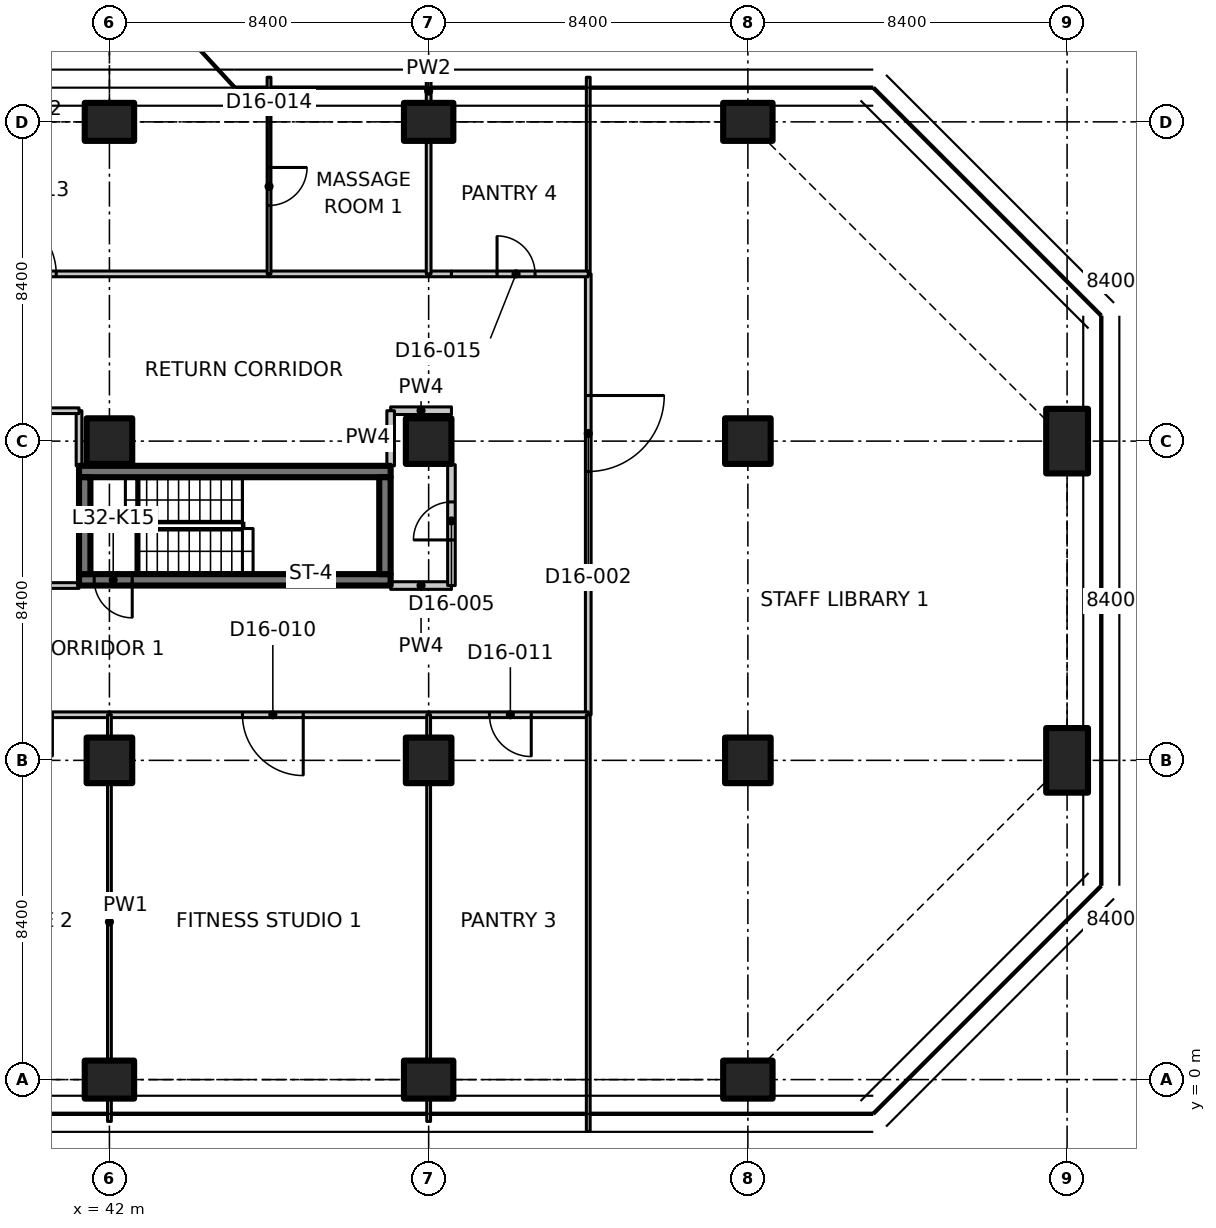
"""IFC4 building model, lengths in metres.
Left out: names, types, materials, properties, quantities, classifications, styles, units other than length and angle.
Written with IfcOpenShell. Run it as: python <this file> out.ifc"""

import sys

from ifc_helpers import new_model, si_unit, direction, frame, frame_2d, origin, origin_2d, place, context, subcontext, project, spatial, polyline, rectangle, outline, extrude, element, fill, save


model = new_model("IFC4")
c1 = context("Model", 3, precision=1e-05, world=origin(), true_north=direction((0.0, 1.0)))
c2 = subcontext(c1, "Body", "Model", "MODEL_VIEW")
j1 = project(units=[si_unit("LENGTHUNIT", "METRE"), si_unit("PLANEANGLEUNIT", "RADIAN")], contexts=[c1])
p1 = place(None, origin())
s1 = spatial("IfcSite", under=j1, at=p1, CompositionType="ELEMENT")
p2 = place(p1, origin())
s2 = spatial("IfcBuilding", under=s1, at=p2, CompositionType="ELEMENT")
p3 = place(p2, frame((0.0, 0.0, 131.3)))
s3 = spatial("IfcBuildingStorey", under=s2, at=p3, CompositionType="ELEMENT", Elevation=131.3)
p4 = place(p3, frame((42.0, 0.0, 0.0), z_axis=(0.0, 0.0, 1.0), x_axis=(0.0, 1.0, 0.0)))
e1 = element("IfcColumn", 1, at=p4, inside=s3, PredefinedType="COLUMN", context=c2, shape_type="SweptSolid", body=[
    extrude(rectangle(XDim=1.0, YDim=1.3, at=origin_2d()), origin(), (0.0, 0.0, 1.0), 3.35),
])
for number, where, z_axis, x_axis in (
    (2, (42.0, 8.4, 0.0), (0.0, 0.0, 1.0), (1.0, 0.0, 0.0)),
    (3, (42.0, 16.8, 0.0), (0.0, 0.0, 1.0), (1.0, 0.0, 0.0)),
):
    element("IfcColumn", number, at=place(p3, frame(where, z_axis=z_axis, x_axis=x_axis)), inside=s3, PredefinedType="COLUMN", context=c2, shape_type="SweptSolid", body=[
        extrude(rectangle(XDim=1.2, YDim=1.2, at=origin_2d()), origin(), (0.0, 0.0, 1.0), 3.35),
    ])
for number, where, z_axis, x_axis in (
    (4, (42.0, 25.2, 0.0), (0.0, 0.0, 1.0), (0.0, 1.0, 0.0)),
    (5, (50.4, 0.0, 0.0), (0.0, 0.0, 1.0), (0.0, 1.0, 0.0)),
):
    element("IfcColumn", number, at=place(p3, frame(where, z_axis=z_axis, x_axis=x_axis)), inside=s3, PredefinedType="COLUMN", context=c2, shape_type="SweptSolid", body=[
        extrude(rectangle(XDim=1.0, YDim=1.3, at=origin_2d()), origin(), (0.0, 0.0, 1.0), 3.35),
    ])
for number, where, z_axis, x_axis in (
    (6, (50.4, 8.4, 0.0), (0.0, 0.0, 1.0), (1.0, 0.0, 0.0)),
    (7, (50.4, 16.8, 0.0), (0.0, 0.0, 1.0), (1.0, 0.0, 0.0)),
):
    element("IfcColumn", number, at=place(p3, frame(where, z_axis=z_axis, x_axis=x_axis)), inside=s3, PredefinedType="COLUMN", context=c2, shape_type="SweptSolid", body=[
        extrude(rectangle(XDim=1.2, YDim=1.2, at=origin_2d()), origin(), (0.0, 0.0, 1.0), 3.35),
    ])
for number, where, z_axis, x_axis in (
    (8, (50.4, 25.2, 0.0), (0.0, 0.0, 1.0), (0.0, 1.0, 0.0)),
    (9, (58.8, 0.0, 0.0), (0.0, 0.0, 1.0), (0.0, 1.0, 0.0)),
):
    element("IfcColumn", number, at=place(p3, frame(where, z_axis=z_axis, x_axis=x_axis)), inside=s3, PredefinedType="COLUMN", context=c2, shape_type="SweptSolid", body=[
        extrude(rectangle(XDim=1.0, YDim=1.3, at=origin_2d()), origin(), (0.0, 0.0, 1.0), 3.35),
    ])
for number, where, z_axis, x_axis in (
    (10, (58.8, 8.4, 0.0), (0.0, 0.0, 1.0), (1.0, 0.0, 0.0)),
    (11, (58.8, 16.8, 0.0), (0.0, 0.0, 1.0), (1.0, 0.0, 0.0)),
):
    element("IfcColumn", number, at=place(p3, frame(where, z_axis=z_axis, x_axis=x_axis)), inside=s3, PredefinedType="COLUMN", context=c2, shape_type="SweptSolid", body=[
        extrude(rectangle(XDim=1.2, YDim=1.2, at=origin_2d()), origin(), (0.0, 0.0, 1.0), 3.35),
    ])
p5 = place(p3, frame((58.8, 25.2, 0.0), z_axis=(0.0, 0.0, 1.0), x_axis=(0.0, 1.0, 0.0)))
e12 = element("IfcColumn", 12, at=p5, inside=s3, PredefinedType="COLUMN", context=c2, shape_type="SweptSolid", body=[
    extrude(rectangle(XDim=1.0, YDim=1.3, at=origin_2d()), origin(), (0.0, 0.0, 1.0), 3.35),
])
for number, where, z_axis, x_axis in (
    (13, (67.2, 8.4, 0.0), (0.0, 0.0, 1.0), (1.0, 0.0, 0.0)),
    (14, (67.2, 16.8, 0.0), (0.0, 0.0, 1.0), (1.0, 0.0, 0.0)),
):
    element("IfcColumn", number, at=place(p3, frame(where, z_axis=z_axis, x_axis=x_axis)), inside=s3, PredefinedType="COLUMN", context=c2, shape_type="SweptSolid", body=[
        extrude(rectangle(XDim=1.1, YDim=1.7, at=origin_2d()), origin(), (0.0, 0.0, 1.0), 3.35),
    ])
p6 = place(p3, frame((49.4, 13.15, 0.0), z_axis=(0.0, 0.0, 1.0), x_axis=(-1.0, 0.0, 0.0)))
e15 = element("IfcWall", 15, at=p6, inside=s3, PredefinedType="SHEAR", context=c2, shape_type="SweptSolid", body=[
    extrude(rectangle(XDim=8.2, YDim=0.3, at=frame_2d((4.1, 0.0))), origin(), (0.0, 0.0, 1.0), 3.35),
])
p7 = place(p6, frame((6.8, 0.0, 0.0)))
e16 = element("IfcOpeningElement", 16, at=p7, cuts=e15, PredefinedType="OPENING", context=c2, shape_type="SweptSolid", body=[
    extrude(rectangle(XDim=1.0, YDim=2.1, at=frame_2d((0.5, 1.05))), frame((0.0, 0.16, 0.0), z_axis=(0.0, -1.0, 0.0), x_axis=(1.0, 0.0, 0.0)), (0.0, 0.0, 1.0), 0.32),
])
p8 = place(p3, frame((41.2, 16.0, 0.0), z_axis=(0.0, 0.0, 1.0), x_axis=(1.0, 0.0, 0.0)))
e17 = element("IfcWall", 17, at=p8, inside=s3, PredefinedType="SHEAR", context=c2, shape_type="SweptSolid", body=[
    extrude(rectangle(XDim=8.2, YDim=0.3, at=frame_2d((4.1, 0.0))), origin(), (0.0, 0.0, 1.0), 3.35),
])
for number, where, z_axis, x_axis in (
    (18, (41.35, 13.3, 0.0), (0.0, 0.0, 1.0), (0.0, 1.0, 0.0)),
    (19, (49.25, 13.3, 0.0), (0.0, 0.0, 1.0), (0.0, 1.0, 0.0)),
):
    element("IfcWall", number, at=place(p3, frame(where, z_axis=z_axis, x_axis=x_axis)), inside=s3, PredefinedType="SHEAR", context=c2, shape_type="SweptSolid", body=[
        extrude(rectangle(XDim=2.55, YDim=0.3, at=frame_2d((1.275, 0.0))), origin(), (0.0, 0.0, 1.0), 3.35),
    ])
p9 = place(p3, frame((54.6, 13.0, 0.0), z_axis=(0.0, 0.0, 1.0), x_axis=(0.0, -1.0, 0.0)))
e20 = element("IfcWall", 20, at=p9, inside=s3, PredefinedType="PARTITIONING", context=c2, shape_type="SweptSolid", body=[
    extrude(rectangle(XDim=3.4, YDim=0.15, at=frame_2d((1.7, 0.0))), origin(), (0.0, 0.0, 1.0), 3.33),
])
p10 = place(p3, frame((33.6, 13.0, 0.0), z_axis=(0.0, 0.0, 1.0), x_axis=(1.0, 0.0, 0.0)))
e21 = element("IfcWall", 21, at=p10, inside=s3, PredefinedType="PARTITIONING", context=c2, shape_type="SweptSolid", body=[
    extrude(rectangle(XDim=7.6, YDim=0.15, at=frame_2d((3.8, 0.0))), origin(), (0.0, 0.0, 1.0), 3.33),
])
p11 = place(p3, frame((49.4, 13.0, 0.0), z_axis=(0.0, 0.0, 1.0), x_axis=(1.0, 0.0, 0.0)))
e22 = element("IfcWall", 22, at=p11, inside=s3, PredefinedType="PARTITIONING", context=c2, shape_type="SweptSolid", body=[
    extrude(rectangle(XDim=1.6, YDim=0.2, at=frame_2d((0.8, 0.0))), origin(), (0.0, 0.0, 1.0), 3.33),
])
p12 = place(p3, frame((42.0, 9.6, 0.0), z_axis=(0.0, 0.0, 1.0), x_axis=(-1.0, 0.0, 0.0)))
e23 = element("IfcWall", 23, at=p12, inside=s3, PredefinedType="PARTITIONING", context=c2, shape_type="SweptSolid", body=[
    extrude(rectangle(XDim=4.2, YDim=0.15, at=frame_2d((2.1, 0.0))), origin(), (0.0, 0.0, 1.0), 3.33),
])
p13 = place(p12, frame((1.5, 0.0, 0.0)))
e24 = element("IfcOpeningElement", 24, at=p13, cuts=e23, PredefinedType="OPENING", context=c2, shape_type="SweptSolid", body=[
    extrude(rectangle(XDim=1.1, YDim=2.1, at=frame_2d((0.55, 1.05))), frame((0.0, 0.085, 0.0), z_axis=(0.0, -1.0, 0.0), x_axis=(1.0, 0.0, 0.0)), (0.0, 0.0, 1.0), 0.17),
])
p14 = place(p3, frame((50.4, 9.6, 0.0), z_axis=(0.0, 0.0, 1.0), x_axis=(-1.0, 0.0, 0.0)))
e25 = element("IfcWall", 25, at=p14, inside=s3, PredefinedType="PARTITIONING", context=c2, shape_type="SweptSolid", body=[
    extrude(rectangle(XDim=8.4, YDim=0.15, at=frame_2d((4.2, 0.0))), origin(), (0.0, 0.0, 1.0), 3.33),
])
p15 = place(p14, frame((3.3, 0.0, 0.0)))
e26 = element("IfcOpeningElement", 26, at=p15, cuts=e25, PredefinedType="OPENING", context=c2, shape_type="SweptSolid", body=[
    extrude(rectangle(XDim=1.6, YDim=2.1, at=frame_2d((0.8, 1.05))), frame((0.0, 0.085, 0.0), z_axis=(0.0, -1.0, 0.0), x_axis=(1.0, 0.0, 0.0)), (0.0, 0.0, 1.0), 0.17),
])
p16 = place(p3, frame((54.6, 9.6, 0.0), z_axis=(0.0, 0.0, 1.0), x_axis=(-1.0, 0.0, 0.0)))
e27 = element("IfcWall", 27, at=p16, inside=s3, PredefinedType="PARTITIONING", context=c2, shape_type="SweptSolid", body=[
    extrude(rectangle(XDim=4.2, YDim=0.15, at=frame_2d((2.1, 0.0))), origin(), (0.0, 0.0, 1.0), 3.33),
])
p17 = place(p16, frame((1.5, 0.0, 0.0)))
e28 = element("IfcOpeningElement", 28, at=p17, cuts=e27, PredefinedType="OPENING", context=c2, shape_type="SweptSolid", body=[
    extrude(rectangle(XDim=1.1, YDim=2.1, at=frame_2d((0.55, 1.05))), frame((0.0, 0.085, 0.0), z_axis=(0.0, -1.0, 0.0), x_axis=(1.0, 0.0, 0.0)), (0.0, 0.0, 1.0), 0.17),
])
p18 = place(p3, frame((54.6, 21.2, 0.0), z_axis=(0.0, 0.0, 1.0), x_axis=(0.0, -1.0, 0.0)))
e29 = element("IfcWall", 29, at=p18, inside=s3, PredefinedType="PARTITIONING", context=c2, shape_type="SweptSolid", body=[
    extrude(rectangle(XDim=8.2, YDim=0.15, at=frame_2d((4.1, 0.0))), origin(), (0.0, 0.0, 1.0), 3.33),
])
p19 = place(p18, frame((3.2, 0.0, 0.0)))
e30 = element("IfcOpeningElement", 30, at=p19, cuts=e29, PredefinedType="OPENING", context=c2, shape_type="SweptSolid", body=[
    extrude(rectangle(XDim=2.0, YDim=2.4, at=frame_2d((1.0, 1.2))), frame((0.0, 0.085, 0.0), z_axis=(0.0, -1.0, 0.0), x_axis=(1.0, 0.0, 0.0)), (0.0, 0.0, 1.0), 0.17),
])
p20 = place(p3, frame((54.6, -1.365, 0.0), z_axis=(0.0, 0.0, 1.0), x_axis=(0.0, 1.0, 0.0)))
e31 = element("IfcWall", 31, at=p20, inside=s3, PredefinedType="PARTITIONING", context=c2, shape_type="SweptSolid", body=[
    extrude(outline(polyline([(0.0, 0.0), (10.965, 0.0), (10.965, 3.33), (1.815, 3.33), (1.813, 2.98), (0.917, 2.98), (0.915, 3.33), (0.265, 3.33), (0.0, 3.33), (0.0, 0.0)])), frame((0.0, 0.05, 0.0), z_axis=(0.0, -1.0, 0.0), x_axis=(1.0, 0.0, 0.0)), (0.0, 0.0, 1.0), 0.1),
])
p21 = place(p3, frame((54.6, 21.2, 0.0), z_axis=(0.0, 0.0, 1.0), x_axis=(0.0, 1.0, 0.0)))
e32 = element("IfcWall", 32, at=p21, inside=s3, PredefinedType="PARTITIONING", context=c2, shape_type="SweptSolid", body=[
    extrude(outline(polyline([(0.0, 0.0), (5.174, 0.0), (5.174, 3.33), (5.1, 3.33), (4.45, 3.33), (4.448, 2.98), (3.552, 2.98), (3.55, 3.33), (0.0, 3.33), (0.0, 0.0)])), frame((0.0, 0.05, 0.0), z_axis=(0.0, -1.0, 0.0), x_axis=(1.0, 0.0, 0.0)), (0.0, 0.0, 1.0), 0.1),
])
p22 = place(p3, frame((41.2, 16.15, 0.0), z_axis=(0.0, 0.0, 1.0), x_axis=(0.0, 1.0, 0.0)))
e33 = element("IfcWall", 33, at=p22, inside=s3, PredefinedType="PARTITIONING", context=c2, shape_type="SweptSolid", body=[
    extrude(rectangle(XDim=1.45, YDim=0.15, at=frame_2d((0.725, 0.0))), origin(), (0.0, 0.0, 1.0), 3.33),
])
p23 = place(p3, frame((41.2, 17.6, 0.0), z_axis=(0.0, 0.0, 1.0), x_axis=(-1.0, 0.0, 0.0)))
e34 = element("IfcWall", 34, at=p23, inside=s3, PredefinedType="PARTITIONING", context=c2, shape_type="SweptSolid", body=[
    extrude(rectangle(XDim=7.6, YDim=0.15, at=frame_2d((3.8, 0.0))), origin(), (0.0, 0.0, 1.0), 3.33),
])
p24 = place(p23, frame((3.3, 0.0, 0.0)))
e35 = element("IfcOpeningElement", 35, at=p24, cuts=e34, PredefinedType="OPENING", context=c2, shape_type="SweptSolid", body=[
    extrude(rectangle(XDim=1.1, YDim=2.1, at=frame_2d((0.55, 1.05))), frame((0.0, 0.085, 0.0), z_axis=(0.0, -1.0, 0.0), x_axis=(1.0, 0.0, 0.0)), (0.0, 0.0, 1.0), 0.17),
])
p25 = place(p3, frame((51.0, 17.6, 0.0), z_axis=(0.0, 0.0, 1.0), x_axis=(-1.0, 0.0, 0.0)))
e36 = element("IfcWall", 36, at=p25, inside=s3, PredefinedType="PARTITIONING", context=c2, shape_type="SweptSolid", body=[
    extrude(rectangle(XDim=1.6, YDim=0.2, at=frame_2d((0.8, 0.0))), origin(), (0.0, 0.0, 1.0), 3.33),
])
p26 = place(p3, frame((49.4, 17.6, 0.0), z_axis=(0.0, 0.0, 1.0), x_axis=(0.0, -1.0, 0.0)))
e37 = element("IfcWall", 37, at=p26, inside=s3, PredefinedType="PARTITIONING", context=c2, shape_type="SweptSolid", body=[
    extrude(rectangle(XDim=1.45, YDim=0.2, at=frame_2d((0.725, 0.0))), origin(), (0.0, 0.0, 1.0), 3.33),
])
p27 = place(p3, frame((33.6, 21.2, 0.0), z_axis=(0.0, 0.0, 1.0), x_axis=(1.0, 0.0, 0.0)))
e38 = element("IfcWall", 38, at=p27, inside=s3, PredefinedType="PARTITIONING", context=c2, shape_type="SweptSolid", body=[
    extrude(rectangle(XDim=12.6, YDim=0.15, at=frame_2d((6.3, 0.0))), origin(), (0.0, 0.0, 1.0), 3.33),
])
p28 = place(p27, frame((5.4, 0.0, 0.0)))
e39 = element("IfcOpeningElement", 39, at=p28, cuts=e38, PredefinedType="OPENING", context=c2, shape_type="SweptSolid", body=[
    extrude(rectangle(XDim=1.6, YDim=2.1, at=frame_2d((0.8, 1.05))), frame((0.0, 0.085, 0.0), z_axis=(0.0, -1.0, 0.0), x_axis=(1.0, 0.0, 0.0)), (0.0, 0.0, 1.0), 0.17),
])
p29 = place(p3, frame((46.2, 21.2, 0.0), z_axis=(0.0, 0.0, 1.0), x_axis=(1.0, 0.0, 0.0)))
e40 = element("IfcWall", 40, at=p29, inside=s3, PredefinedType="PARTITIONING", context=c2, shape_type="SweptSolid", body=[
    extrude(rectangle(XDim=4.2, YDim=0.15, at=frame_2d((2.1, 0.0))), origin(), (0.0, 0.0, 1.0), 3.33),
])
p30 = place(p3, frame((50.4, 21.2, 0.0), z_axis=(0.0, 0.0, 1.0), x_axis=(1.0, 0.0, 0.0)))
e41 = element("IfcWall", 41, at=p30, inside=s3, PredefinedType="PARTITIONING", context=c2, shape_type="SweptSolid", body=[
    extrude(rectangle(XDim=0.6, YDim=0.15, at=frame_2d((0.3, 0.0))), origin(), (0.0, 0.0, 1.0), 3.33),
])
p31 = place(p3, frame((51.0, 13.0, 0.0), z_axis=(0.0, 0.0, 1.0), x_axis=(0.0, 1.0, 0.0)))
e42 = element("IfcWall", 42, at=p31, inside=s3, PredefinedType="PARTITIONING", context=c2, shape_type="SweptSolid", body=[
    extrude(rectangle(XDim=3.18, YDim=0.2, at=frame_2d((1.59, 0.0))), origin(), (0.0, 0.0, 1.0), 3.33),
])
p32 = place(p31, frame((1.2, 0.0, 0.0)))
e43 = element("IfcOpeningElement", 43, at=p32, cuts=e42, PredefinedType="OPENING", context=c2, shape_type="SweptSolid", body=[
    extrude(rectangle(XDim=1.0, YDim=2.1, at=frame_2d((0.5, 1.05))), frame((0.0, 0.11, 0.0), z_axis=(0.0, -1.0, 0.0), x_axis=(1.0, 0.0, 0.0)), (0.0, 0.0, 1.0), 0.22),
])
p33 = place(p3, frame((51.0, 21.2, 0.0), z_axis=(0.0, 0.0, 1.0), x_axis=(1.0, 0.0, 0.0)))
e44 = element("IfcWall", 44, at=p33, inside=s3, PredefinedType="PARTITIONING", context=c2, shape_type="SweptSolid", body=[
    extrude(rectangle(XDim=3.6, YDim=0.15, at=frame_2d((1.8, 0.0))), origin(), (0.0, 0.0, 1.0), 3.33),
])
p34 = place(p33, frame((1.2, 0.0, 0.0)))
e45 = element("IfcOpeningElement", 45, at=p34, cuts=e44, PredefinedType="OPENING", context=c2, shape_type="SweptSolid", body=[
    extrude(rectangle(XDim=1.0, YDim=2.1, at=frame_2d((0.5, 1.05))), frame((0.0, 0.085, 0.0), z_axis=(0.0, -1.0, 0.0), x_axis=(1.0, 0.0, 0.0)), (0.0, 0.0, 1.0), 0.17),
])
p35 = place(p3, frame((42.0, 9.6, 0.0), z_axis=(0.0, 0.0, 1.0), x_axis=(0.0, -1.0, 0.0)))
e46 = element("IfcWall", 46, at=p35, inside=s3, PredefinedType="PARTITIONING", context=c2, shape_type="SweptSolid", body=[
    extrude(rectangle(XDim=0.58, YDim=0.1, at=frame_2d((0.29, 0.0))), origin(), (0.0, 0.0, 1.0), 3.33),
])
p36 = place(p3, frame((42.0, 7.78, 0.0), z_axis=(0.0, 0.0, 1.0), x_axis=(0.0, -1.0, 0.0)))
e47 = element("IfcWall", 47, at=p36, inside=s3, PredefinedType="PARTITIONING", context=c2, shape_type="SweptSolid", body=[
    extrude(rectangle(XDim=7.26, YDim=0.1, at=frame_2d((3.63, 0.0))), origin(), (0.0, 0.0, 1.0), 3.33),
])
for number, where, z_axis, x_axis in (
    (48, (42.0, -0.52, 0.0), (0.0, 0.0, 1.0), (0.0, -1.0, 0.0)),
    (49, (50.4, 9.6, 0.0), (0.0, 0.0, 1.0), (0.0, -1.0, 0.0)),
):
    element("IfcWall", number, at=place(p3, frame(where, z_axis=z_axis, x_axis=x_axis)), inside=s3, PredefinedType="PARTITIONING", context=c2, shape_type="SweptSolid", body=[
        extrude(rectangle(XDim=0.58, YDim=0.1, at=frame_2d((0.29, 0.0))), origin(), (0.0, 0.0, 1.0), 3.33),
    ])
p37 = place(p3, frame((50.4, 7.78, 0.0), z_axis=(0.0, 0.0, 1.0), x_axis=(0.0, -1.0, 0.0)))
e50 = element("IfcWall", 50, at=p37, inside=s3, PredefinedType="PARTITIONING", context=c2, shape_type="SweptSolid", body=[
    extrude(rectangle(XDim=7.26, YDim=0.1, at=frame_2d((3.63, 0.0))), origin(), (0.0, 0.0, 1.0), 3.33),
])
p38 = place(p3, frame((50.4, -0.52, 0.0), z_axis=(0.0, 0.0, 1.0), x_axis=(0.0, -1.0, 0.0)))
e51 = element("IfcWall", 51, at=p38, inside=s3, PredefinedType="PARTITIONING", context=c2, shape_type="SweptSolid", body=[
    extrude(rectangle(XDim=0.58, YDim=0.1, at=frame_2d((0.29, 0.0))), origin(), (0.0, 0.0, 1.0), 3.33),
])
p39 = place(p3, frame((46.2, 26.374, 0.0), z_axis=(0.0, 0.0, 1.0), x_axis=(0.0, -1.0, 0.0)))
e52 = element("IfcWall", 52, at=p39, inside=s3, PredefinedType="PARTITIONING", context=c2, shape_type="SweptSolid", body=[
    extrude(outline(polyline([(0.0, 0.0), (5.174, 0.0), (5.174, 3.33), (1.624, 3.33), (1.622, 2.98), (0.726, 2.98), (0.724, 3.33), (0.074, 3.33), (0.0, 3.33), (0.0, 0.0)])), frame((0.0, 0.05, 0.0), z_axis=(0.0, -1.0, 0.0), x_axis=(1.0, 0.0, 0.0)), (0.0, 0.0, 1.0), 0.1),
])
p40 = place(p39, frame((2.374, 0.0, 0.0)))
e53 = element("IfcOpeningElement", 53, at=p40, cuts=e52, PredefinedType="OPENING", context=c2, shape_type="SweptSolid", body=[
    extrude(rectangle(XDim=1.0, YDim=2.1, at=frame_2d((0.5, 1.05))), frame((0.0, 0.06, 0.0), z_axis=(0.0, -1.0, 0.0), x_axis=(1.0, 0.0, 0.0)), (0.0, 0.0, 1.0), 0.12),
])
p41 = place(p3, frame((50.4, 26.3, 0.0), z_axis=(0.0, 0.0, 1.0), x_axis=(0.0, -1.0, 0.0)))
e54 = element("IfcWall", 54, at=p41, inside=s3, PredefinedType="PARTITIONING", context=c2, shape_type="SweptSolid", body=[
    extrude(rectangle(XDim=0.58, YDim=0.125, at=frame_2d((0.29, 0.0))), origin(), (0.0, 0.0, 1.0), 3.33),
])
p42 = place(p3, frame((50.4, 24.68, 0.0), z_axis=(0.0, 0.0, 1.0), x_axis=(0.0, -1.0, 0.0)))
e55 = element("IfcWall", 55, at=p42, inside=s3, PredefinedType="PARTITIONING", context=c2, shape_type="SweptSolid", body=[
    extrude(rectangle(XDim=3.48, YDim=0.125, at=frame_2d((1.74, 0.0))), origin(), (0.0, 0.0, 1.0), 3.33),
])
p43 = place(p7, origin())
e56 = element("IfcDoor", 56, at=p43, inside=s3, OperationType="SINGLE_SWING_RIGHT", PredefinedType="DOOR", context=c2, shape_type="SweptSolid", body=[
    extrude(rectangle(XDim=1.0, YDim=2.1, at=frame_2d((0.5, 1.05))), frame((0.0, 0.025, 0.0), z_axis=(0.0, -1.0, 0.0), x_axis=(1.0, 0.0, 0.0)), (0.0, 0.0, 1.0), 0.05),
])
fill(e16, e56)
p44 = place(p19, origin())
e57 = element("IfcDoor", 57, at=p44, inside=s3, OperationType="DOUBLE_DOOR_SINGLE_SWING", PredefinedType="DOOR", context=c2, shape_type="SweptSolid", body=[
    extrude(rectangle(XDim=2.0, YDim=2.4, at=frame_2d((1.0, 1.2))), frame((0.0, 0.025, 0.0), z_axis=(0.0, -1.0, 0.0), x_axis=(1.0, 0.0, 0.0)), (0.0, 0.0, 1.0), 0.05),
])
fill(e30, e57)
p45 = place(p32, origin())
e58 = element("IfcDoor", 58, at=p45, inside=s3, OperationType="SINGLE_SWING_LEFT", PredefinedType="DOOR", context=c2, shape_type="SweptSolid", body=[
    extrude(rectangle(XDim=1.0, YDim=2.1, at=frame_2d((0.5, 1.05))), frame((0.0, 0.025, 0.0), z_axis=(0.0, -1.0, 0.0), x_axis=(1.0, 0.0, 0.0)), (0.0, 0.0, 1.0), 0.05),
])
fill(e43, e58)
p46 = place(p15, origin())
e59 = element("IfcDoor", 59, at=p46, inside=s3, OperationType="DOUBLE_DOOR_SINGLE_SWING", PredefinedType="DOOR", context=c2, shape_type="SweptSolid", body=[
    extrude(rectangle(XDim=1.6, YDim=2.1, at=frame_2d((0.8, 1.05))), frame((0.0, 0.025, 0.0), z_axis=(0.0, -1.0, 0.0), x_axis=(1.0, 0.0, 0.0)), (0.0, 0.0, 1.0), 0.05),
])
fill(e26, e59)
p47 = place(p17, origin())
e60 = element("IfcDoor", 60, at=p47, inside=s3, OperationType="SINGLE_SWING_LEFT", PredefinedType="DOOR", context=c2, shape_type="SweptSolid", body=[
    extrude(rectangle(XDim=1.1, YDim=2.1, at=frame_2d((0.55, 1.05))), frame((0.0, 0.025, 0.0), z_axis=(0.0, -1.0, 0.0), x_axis=(1.0, 0.0, 0.0)), (0.0, 0.0, 1.0), 0.05),
])
fill(e28, e60)
p48 = place(p28, origin())
e61 = element("IfcDoor", 61, at=p48, inside=s3, OperationType="DOUBLE_DOOR_SINGLE_SWING", PredefinedType="DOOR", context=c2, shape_type="SweptSolid", body=[
    extrude(rectangle(XDim=1.6, YDim=2.1, at=frame_2d((0.8, 1.05))), frame((0.0, 0.025, 0.0), z_axis=(0.0, -1.0, 0.0), x_axis=(1.0, 0.0, 0.0)), (0.0, 0.0, 1.0), 0.05),
])
fill(e39, e61)
p49 = place(p40, origin())
e62 = element("IfcDoor", 62, at=p49, inside=s3, OperationType="SINGLE_SWING_LEFT", PredefinedType="DOOR", context=c2, shape_type="SweptSolid", body=[
    extrude(rectangle(XDim=1.0, YDim=2.1, at=frame_2d((0.5, 1.05))), frame((0.0, 0.025, 0.0), z_axis=(0.0, -1.0, 0.0), x_axis=(1.0, 0.0, 0.0)), (0.0, 0.0, 1.0), 0.05),
])
fill(e53, e62)
p50 = place(p34, origin())
e63 = element("IfcDoor", 63, at=p50, inside=s3, OperationType="SINGLE_SWING_LEFT", PredefinedType="DOOR", context=c2, shape_type="SweptSolid", body=[
    extrude(rectangle(XDim=1.0, YDim=2.1, at=frame_2d((0.5, 1.05))), frame((0.0, 0.025, 0.0), z_axis=(0.0, -1.0, 0.0), x_axis=(1.0, 0.0, 0.0)), (0.0, 0.0, 1.0), 0.05),
])
fill(e45, e63)
save(model, sys.argv[1])
